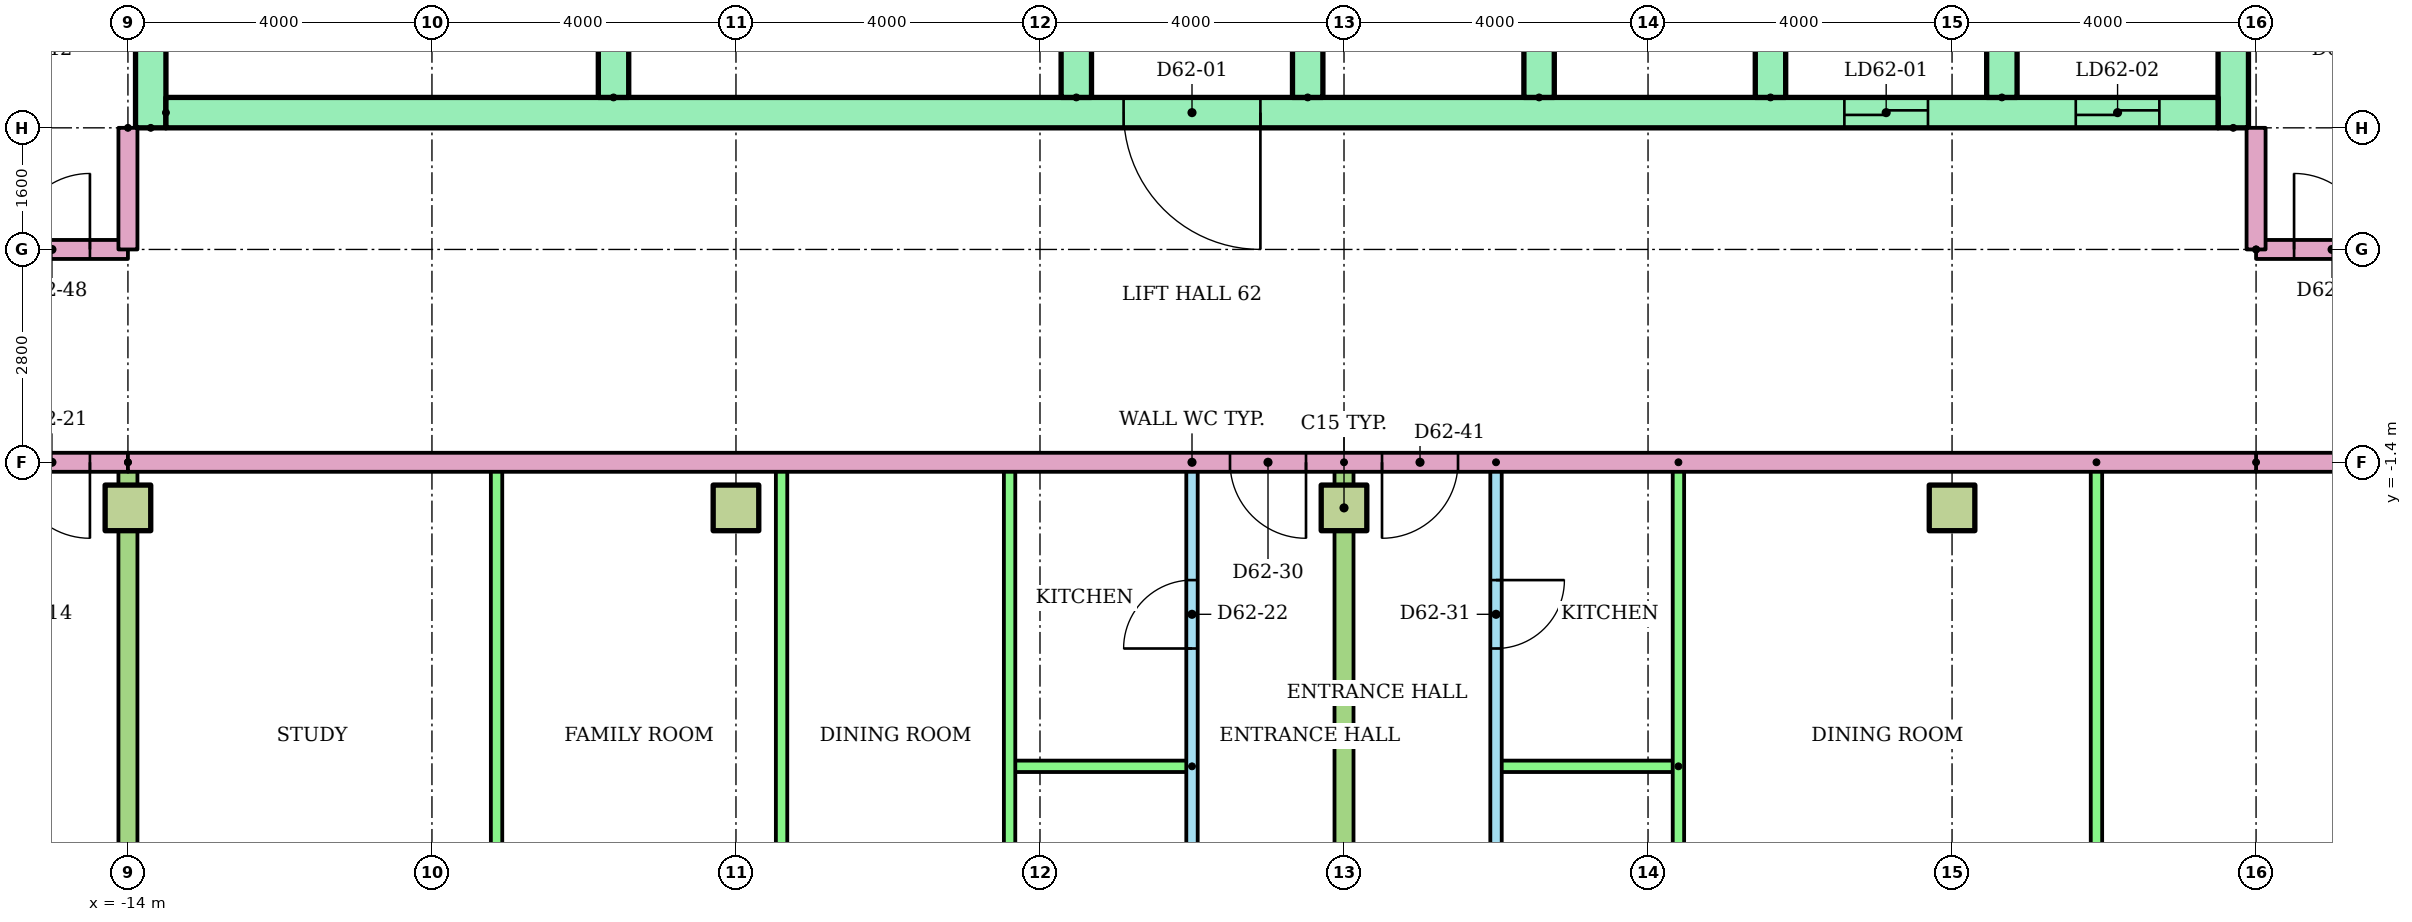
"""IFC4 building model, lengths in metres.
Left out: names, types, materials, properties, quantities, classifications, styles, units other than length and angle.
Written with IfcOpenShell. Run it as: python <this file> out.ifc"""

import sys

from ifc_helpers import new_model, si_unit, direction, frame, frame_2d, origin, origin_2d, place, context, subcontext, project, spatial, rectangle, extrude, element, fill, save


model = new_model("IFC4")
c1 = context("Model", 3, precision=1e-05, world=origin(), true_north=direction((0.0, 1.0)))
c2 = subcontext(c1, "Body", "Model", "MODEL_VIEW")
j1 = project(units=[si_unit("LENGTHUNIT", "METRE"), si_unit("PLANEANGLEUNIT", "RADIAN")], contexts=[c1])
p1 = place(None, origin())
s1 = spatial("IfcSite", under=j1, at=p1, CompositionType="ELEMENT")
p2 = place(p1, origin())
s2 = spatial("IfcBuilding", under=s1, at=p2, CompositionType="ELEMENT")
p3 = place(p2, frame((0.0, 0.0, 236.4)))
s3 = spatial("IfcBuildingStorey", under=s2, at=p3, CompositionType="ELEMENT", Elevation=236.4)
for number, where in (
    (1, (-14.0, -2.0, 0.0)),
    (2, (-6.0, -2.0, 0.0)),
    (3, (2.0, -2.0, 0.0)),
    (4, (10.0, -2.0, 0.0)),
):
    element("IfcColumn", number, at=place(p3, frame(where)), inside=s3, PredefinedType="COLUMN", context=c2, shape_type="SweptSolid", body=[
        extrude(rectangle(XDim=0.6, YDim=0.6, at=origin_2d()), origin(), (0.0, 0.0, 1.0), 3.2),
    ])
for number, where, z_axis, x_axis in (
    (5, (-13.7, 3.0, 0.0), (0.0, 0.0, 1.0), (0.0, 1.0, 0.0)),
    (6, (13.7, 3.0, 0.0), (0.0, 0.0, 1.0), (0.0, 1.0, 0.0)),
):
    element("IfcWall", number, at=place(p3, frame(where, z_axis=z_axis, x_axis=x_axis)), inside=s3, PredefinedType="SHEAR", context=c2, shape_type="SweptSolid", body=[
        extrude(rectangle(XDim=17.0, YDim=0.4, at=frame_2d((8.5, 0.0))), origin(), (0.0, 0.0, 1.0), 2.8),
    ])
p4 = place(p3, frame((-13.5, 3.2, 0.0)))
e7 = element("IfcWall", 7, at=p4, inside=s3, PredefinedType="SHEAR", context=c2, shape_type="SweptSolid", body=[
    extrude(rectangle(XDim=27.0, YDim=0.4, at=frame_2d((13.5, 0.0))), origin(), (0.0, 0.0, 1.0), 2.8),
])
p5 = place(p4, frame((22.083, 0.0, 0.0)))
e8 = element("IfcOpeningElement", 8, at=p5, cuts=e7, PredefinedType="OPENING", context=c2, shape_type="SweptSolid", body=[
    extrude(rectangle(XDim=1.1, YDim=2.1, at=frame_2d((0.55, 1.05))), frame((0.0, 0.21, 0.0), z_axis=(0.0, -1.0, 0.0), x_axis=(1.0, 0.0, 0.0)), (0.0, 0.0, 1.0), 0.42),
])
p6 = place(p4, frame((25.128, 0.0, 0.0)))
e9 = element("IfcOpeningElement", 9, at=p6, cuts=e7, PredefinedType="OPENING", context=c2, shape_type="SweptSolid", body=[
    extrude(rectangle(XDim=1.1, YDim=2.1, at=frame_2d((0.55, 1.05))), frame((0.0, 0.21, 0.0), z_axis=(0.0, -1.0, 0.0), x_axis=(1.0, 0.0, 0.0)), (0.0, 0.0, 1.0), 0.42),
])
p7 = place(p4, frame((12.6, 0.0, 0.0)))
e10 = element("IfcOpeningElement", 10, at=p7, cuts=e7, PredefinedType="OPENING", context=c2, shape_type="SweptSolid", body=[
    extrude(rectangle(XDim=1.8, YDim=2.1, at=frame_2d((0.9, 1.05))), frame((0.0, 0.21, 0.0), z_axis=(0.0, -1.0, 0.0), x_axis=(1.0, 0.0, 0.0)), (0.0, 0.0, 1.0), 0.42),
])
for number, where, z_axis, x_axis in (
    (11, (-7.611, 3.4, 0.0), (0.0, 0.0, 1.0), (0.0, 1.0, 0.0)),
    (12, (-1.522, 3.4, 0.0), (0.0, 0.0, 1.0), (0.0, 1.0, 0.0)),
    (13, (1.522, 3.4, 0.0), (0.0, 0.0, 1.0), (0.0, 1.0, 0.0)),
    (14, (4.567, 3.4, 0.0), (0.0, 0.0, 1.0), (0.0, 1.0, 0.0)),
    (15, (7.611, 3.4, 0.0), (0.0, 0.0, 1.0), (0.0, 1.0, 0.0)),
    (16, (10.656, 3.4, 0.0), (0.0, 0.0, 1.0), (0.0, 1.0, 0.0)),
):
    element("IfcWall", number, at=place(p3, frame(where, z_axis=z_axis, x_axis=x_axis)), inside=s3, PredefinedType="SHEAR", context=c2, shape_type="SweptSolid", body=[
        extrude(rectangle(XDim=3.0, YDim=0.4, at=frame_2d((1.5, 0.0))), origin(), (0.0, 0.0, 1.0), 2.8),
    ])
p8 = place(p3, frame((0.0, -8.6, 0.0), z_axis=(0.0, 0.0, 1.0), x_axis=(0.0, 1.0, 0.0)))
e17 = element("IfcWall", 17, at=p8, inside=s3, PredefinedType="PARTITIONING", context=c2, shape_type="SweptSolid", body=[
    extrude(rectangle(XDim=7.2, YDim=0.15, at=frame_2d((3.6, 0.0))), origin(), (0.0, 0.0, 1.0), 2.4),
])
p9 = place(p8, frame((4.75, 0.0, 0.0)))
e18 = element("IfcOpeningElement", 18, at=p9, cuts=e17, PredefinedType="OPENING", context=c2, shape_type="SweptSolid", body=[
    extrude(rectangle(XDim=0.9, YDim=2.1, at=frame_2d((0.45, 1.05))), frame((0.0, 0.085, 0.0), z_axis=(0.0, -1.0, 0.0), x_axis=(1.0, 0.0, 0.0)), (0.0, 0.0, 1.0), 0.17),
])
p10 = place(p8, frame((1.2, 0.0, 0.0)))
e19 = element("IfcOpeningElement", 19, at=p10, cuts=e17, PredefinedType="OPENING", context=c2, shape_type="SweptSolid", body=[
    extrude(rectangle(XDim=0.8, YDim=2.1, at=frame_2d((0.4, 1.05))), frame((0.0, 0.085, 0.0), z_axis=(0.0, -1.0, 0.0), x_axis=(1.0, 0.0, 0.0)), (0.0, 0.0, 1.0), 0.17),
])
p11 = place(p3, frame((0.0, -5.4, 0.0), z_axis=(0.0, 0.0, 1.0), x_axis=(-1.0, 0.0, 0.0)))
e20 = element("IfcWall", 20, at=p11, inside=s3, PredefinedType="PARTITIONING", context=c2, shape_type="SweptSolid", body=[
    extrude(rectangle(XDim=2.4, YDim=0.15, at=frame_2d((1.2, 0.0))), origin(), (0.0, 0.0, 1.0), 2.4),
])
for number, where, z_axis, x_axis in (
    (21, (-2.4, -8.6, 0.0), (0.0, 0.0, 1.0), (0.0, 1.0, 0.0)),
    (22, (-5.4, -8.6, 0.0), (0.0, 0.0, 1.0), (0.0, 1.0, 0.0)),
    (23, (-9.15, -8.6, 0.0), (0.0, 0.0, 1.0), (0.0, 1.0, 0.0)),
):
    element("IfcWall", number, at=place(p3, frame(where, z_axis=z_axis, x_axis=x_axis)), inside=s3, PredefinedType="PARTITIONING", context=c2, shape_type="SweptSolid", body=[
        extrude(rectangle(XDim=7.2, YDim=0.15, at=frame_2d((3.6, 0.0))), origin(), (0.0, 0.0, 1.0), 2.4),
    ])
p12 = place(p3, frame((-14.0, -1.4, 0.0), z_axis=(0.0, 0.0, 1.0), x_axis=(0.0, -1.0, 0.0)))
e24 = element("IfcWall", 24, at=p12, inside=s3, PredefinedType="PARTITIONING", context=c2, shape_type="SweptSolid", body=[
    extrude(rectangle(XDim=15.11, YDim=0.25, at=frame_2d((7.555, 0.0))), origin(), (0.0, 0.0, 1.0), 2.4),
])
p13 = place(p3, frame((4.0, -1.4, 0.0), z_axis=(0.0, 0.0, 1.0), x_axis=(0.0, -1.0, 0.0)))
e25 = element("IfcWall", 25, at=p13, inside=s3, PredefinedType="PARTITIONING", context=c2, shape_type="SweptSolid", body=[
    extrude(rectangle(XDim=7.2, YDim=0.15, at=frame_2d((3.6, 0.0))), origin(), (0.0, 0.0, 1.0), 2.4),
])
p14 = place(p13, frame((1.55, 0.0, 0.0)))
e26 = element("IfcOpeningElement", 26, at=p14, cuts=e25, PredefinedType="OPENING", context=c2, shape_type="SweptSolid", body=[
    extrude(rectangle(XDim=0.9, YDim=2.1, at=frame_2d((0.45, 1.05))), frame((0.0, 0.085, 0.0), z_axis=(0.0, -1.0, 0.0), x_axis=(1.0, 0.0, 0.0)), (0.0, 0.0, 1.0), 0.17),
])
p15 = place(p13, frame((5.2, 0.0, 0.0)))
e27 = element("IfcOpeningElement", 27, at=p15, cuts=e25, PredefinedType="OPENING", context=c2, shape_type="SweptSolid", body=[
    extrude(rectangle(XDim=0.8, YDim=2.1, at=frame_2d((0.4, 1.05))), frame((0.0, 0.085, 0.0), z_axis=(0.0, -1.0, 0.0), x_axis=(1.0, 0.0, 0.0)), (0.0, 0.0, 1.0), 0.17),
])
p16 = place(p3, frame((6.4, -5.4, 0.0), z_axis=(0.0, 0.0, 1.0), x_axis=(-1.0, 0.0, 0.0)))
e28 = element("IfcWall", 28, at=p16, inside=s3, PredefinedType="PARTITIONING", context=c2, shape_type="SweptSolid", body=[
    extrude(rectangle(XDim=2.4, YDim=0.15, at=frame_2d((1.2, 0.0))), origin(), (0.0, 0.0, 1.0), 2.4),
])
for number, where, z_axis, x_axis in (
    (29, (6.4, -1.4, 0.0), (0.0, 0.0, 1.0), (0.0, -1.0, 0.0)),
    (30, (11.9, -1.4, 0.0), (0.0, 0.0, 1.0), (0.0, -1.0, 0.0)),
):
    element("IfcWall", number, at=place(p3, frame(where, z_axis=z_axis, x_axis=x_axis)), inside=s3, PredefinedType="PARTITIONING", context=c2, shape_type="SweptSolid", body=[
        extrude(rectangle(XDim=7.2, YDim=0.15, at=frame_2d((3.6, 0.0))), origin(), (0.0, 0.0, 1.0), 2.4),
    ])
p17 = place(p3, frame((2.0, -1.4, 0.0), z_axis=(0.0, 0.0, 1.0), x_axis=(0.0, -1.0, 0.0)))
e31 = element("IfcWall", 31, at=p17, inside=s3, PredefinedType="PARTITIONING", context=c2, shape_type="SweptSolid", body=[
    extrude(rectangle(XDim=15.11, YDim=0.25, at=frame_2d((7.555, 0.0))), origin(), (0.0, 0.0, 1.0), 2.4),
])
p18 = place(p3, frame((-14.0, -1.4, 0.0), z_axis=(0.0, 0.0, 1.0), x_axis=(-1.0, 0.0, 0.0)))
e32 = element("IfcWall", 32, at=p18, inside=s3, PredefinedType="PARTITIONING", context=c2, shape_type="SweptSolid", body=[
    extrude(rectangle(XDim=14.92, YDim=0.25, at=frame_2d((7.46, 0.0))), origin(), (0.0, 0.0, 1.0), 2.4),
])
p19 = place(p18, frame((0.5, 0.0, 0.0)))
e33 = element("IfcOpeningElement", 33, at=p19, cuts=e32, PredefinedType="OPENING", context=c2, shape_type="SweptSolid", body=[
    extrude(rectangle(XDim=1.0, YDim=2.1, at=frame_2d((0.5, 1.05))), frame((0.0, 0.135, 0.0), z_axis=(0.0, -1.0, 0.0), x_axis=(1.0, 0.0, 0.0)), (0.0, 0.0, 1.0), 0.27),
])
p20 = place(p3, frame((28.92, -1.4, 0.0), z_axis=(0.0, 0.0, 1.0), x_axis=(-1.0, 0.0, 0.0)))
e34 = element("IfcWall", 34, at=p20, inside=s3, PredefinedType="PARTITIONING", context=c2, shape_type="SweptSolid", body=[
    extrude(rectangle(XDim=14.92, YDim=0.25, at=frame_2d((7.46, 0.0))), origin(), (0.0, 0.0, 1.0), 2.4),
])
p21 = place(p3, frame((-28.92, 1.4, 0.0)))
e35 = element("IfcWall", 35, at=p21, inside=s3, PredefinedType="PARTITIONING", context=c2, shape_type="SweptSolid", body=[
    extrude(rectangle(XDim=14.92, YDim=0.25, at=frame_2d((7.46, 0.0))), origin(), (0.0, 0.0, 1.0), 2.4),
])
p22 = place(p21, frame((13.42, 0.0, 0.0)))
e36 = element("IfcOpeningElement", 36, at=p22, cuts=e35, PredefinedType="OPENING", context=c2, shape_type="SweptSolid", body=[
    extrude(rectangle(XDim=1.0, YDim=2.1, at=frame_2d((0.5, 1.05))), frame((0.0, 0.135, 0.0), z_axis=(0.0, -1.0, 0.0), x_axis=(1.0, 0.0, 0.0)), (0.0, 0.0, 1.0), 0.27),
])
p23 = place(p3, frame((14.0, 1.4, 0.0)))
e37 = element("IfcWall", 37, at=p23, inside=s3, PredefinedType="PARTITIONING", context=c2, shape_type="SweptSolid", body=[
    extrude(rectangle(XDim=14.92, YDim=0.25, at=frame_2d((7.46, 0.0))), origin(), (0.0, 0.0, 1.0), 2.4),
])
p24 = place(p23, frame((0.5, 0.0, 0.0)))
e38 = element("IfcOpeningElement", 38, at=p24, cuts=e37, PredefinedType="OPENING", context=c2, shape_type="SweptSolid", body=[
    extrude(rectangle(XDim=1.0, YDim=2.1, at=frame_2d((0.5, 1.05))), frame((0.0, 0.135, 0.0), z_axis=(0.0, -1.0, 0.0), x_axis=(1.0, 0.0, 0.0)), (0.0, 0.0, 1.0), 0.27),
])
p25 = place(p3, frame((14.0, -1.4, 0.0), z_axis=(0.0, 0.0, 1.0), x_axis=(-1.0, 0.0, 0.0)))
e39 = element("IfcWall", 39, at=p25, inside=s3, PredefinedType="PARTITIONING", context=c2, shape_type="SweptSolid", body=[
    extrude(rectangle(XDim=28.0, YDim=0.25, at=frame_2d((14.0, 0.0))), origin(), (0.0, 0.0, 1.0), 2.4),
])
p26 = place(p25, frame((12.5, 0.0, 0.0)))
e40 = element("IfcOpeningElement", 40, at=p26, cuts=e39, PredefinedType="OPENING", context=c2, shape_type="SweptSolid", body=[
    extrude(rectangle(XDim=1.0, YDim=2.1, at=frame_2d((0.5, 1.05))), frame((0.0, 0.135, 0.0), z_axis=(0.0, -1.0, 0.0), x_axis=(1.0, 0.0, 0.0)), (0.0, 0.0, 1.0), 0.27),
])
p27 = place(p25, frame((10.5, 0.0, 0.0)))
e41 = element("IfcOpeningElement", 41, at=p27, cuts=e39, PredefinedType="OPENING", context=c2, shape_type="SweptSolid", body=[
    extrude(rectangle(XDim=1.0, YDim=2.1, at=frame_2d((0.5, 1.05))), frame((0.0, 0.135, 0.0), z_axis=(0.0, -1.0, 0.0), x_axis=(1.0, 0.0, 0.0)), (0.0, 0.0, 1.0), 0.27),
])
for number, where, z_axis, x_axis in (
    (42, (-14.0, 3.0, 0.0), (0.0, 0.0, 1.0), (0.0, -1.0, 0.0)),
    (43, (14.0, 1.4, 0.0), (0.0, 0.0, 1.0), (0.0, 1.0, 0.0)),
):
    element("IfcWall", number, at=place(p3, frame(where, z_axis=z_axis, x_axis=x_axis)), inside=s3, PredefinedType="PARTITIONING", context=c2, shape_type="SweptSolid", body=[
        extrude(rectangle(XDim=1.6, YDim=0.25, at=frame_2d((0.8, 0.0))), origin(), (0.0, 0.0, 1.0), 2.4),
    ])
p28 = place(p5, origin())
e44 = element("IfcDoor", 44, at=p28, inside=s3, OperationType="SLIDING_TO_LEFT", PredefinedType="DOOR", context=c2, shape_type="SweptSolid", body=[
    extrude(rectangle(XDim=1.1, YDim=2.1, at=frame_2d((0.55, 1.05))), frame((0.0, 0.025, 0.0), z_axis=(0.0, -1.0, 0.0), x_axis=(1.0, 0.0, 0.0)), (0.0, 0.0, 1.0), 0.05),
])
fill(e8, e44)
p29 = place(p6, origin())
e45 = element("IfcDoor", 45, at=p29, inside=s3, OperationType="SLIDING_TO_LEFT", PredefinedType="DOOR", context=c2, shape_type="SweptSolid", body=[
    extrude(rectangle(XDim=1.1, YDim=2.1, at=frame_2d((0.55, 1.05))), frame((0.0, 0.025, 0.0), z_axis=(0.0, -1.0, 0.0), x_axis=(1.0, 0.0, 0.0)), (0.0, 0.0, 1.0), 0.05),
])
fill(e9, e45)
p30 = place(p7, frame((1.8, 0.0, 0.0), z_axis=(0.0, 0.0, 1.0), x_axis=(-1.0, 0.0, 0.0)))
e46 = element("IfcDoor", 46, at=p30, inside=s3, OperationType="DOUBLE_DOOR_SINGLE_SWING", PredefinedType="DOOR", context=c2, shape_type="SweptSolid", body=[
    extrude(rectangle(XDim=1.8, YDim=2.1, at=frame_2d((0.9, 1.05))), frame((0.0, 0.025, 0.0), z_axis=(0.0, -1.0, 0.0), x_axis=(1.0, 0.0, 0.0)), (0.0, 0.0, 1.0), 0.05),
])
fill(e10, e46)
p31 = place(p19, origin())
e47 = element("IfcDoor", 47, at=p31, inside=s3, OperationType="SINGLE_SWING_LEFT", PredefinedType="DOOR", context=c2, shape_type="SweptSolid", body=[
    extrude(rectangle(XDim=1.0, YDim=2.1, at=frame_2d((0.5, 1.05))), frame((0.0, 0.025, 0.0), z_axis=(0.0, -1.0, 0.0), x_axis=(1.0, 0.0, 0.0)), (0.0, 0.0, 1.0), 0.05),
])
fill(e33, e47)
p32 = place(p9, origin())
e48 = element("IfcDoor", 48, at=p32, inside=s3, OperationType="SINGLE_SWING_LEFT", PredefinedType="DOOR", context=c2, shape_type="SweptSolid", body=[
    extrude(rectangle(XDim=0.9, YDim=2.1, at=frame_2d((0.45, 1.05))), frame((0.0, 0.025, 0.0), z_axis=(0.0, -1.0, 0.0), x_axis=(1.0, 0.0, 0.0)), (0.0, 0.0, 1.0), 0.05),
])
fill(e18, e48)
p33 = place(p26, origin())
e49 = element("IfcDoor", 49, at=p33, inside=s3, OperationType="SINGLE_SWING_LEFT", PredefinedType="DOOR", context=c2, shape_type="SweptSolid", body=[
    extrude(rectangle(XDim=1.0, YDim=2.1, at=frame_2d((0.5, 1.05))), frame((0.0, 0.025, 0.0), z_axis=(0.0, -1.0, 0.0), x_axis=(1.0, 0.0, 0.0)), (0.0, 0.0, 1.0), 0.05),
])
fill(e40, e49)
p34 = place(p14, origin())
e50 = element("IfcDoor", 50, at=p34, inside=s3, OperationType="SINGLE_SWING_LEFT", PredefinedType="DOOR", context=c2, shape_type="SweptSolid", body=[
    extrude(rectangle(XDim=0.9, YDim=2.1, at=frame_2d((0.45, 1.05))), frame((0.0, 0.025, 0.0), z_axis=(0.0, -1.0, 0.0), x_axis=(1.0, 0.0, 0.0)), (0.0, 0.0, 1.0), 0.05),
])
fill(e26, e50)
p35 = place(p27, origin())
e51 = element("IfcDoor", 51, at=p35, inside=s3, OperationType="SINGLE_SWING_RIGHT", PredefinedType="DOOR", context=c2, shape_type="SweptSolid", body=[
    extrude(rectangle(XDim=1.0, YDim=2.1, at=frame_2d((0.5, 1.05))), frame((0.0, 0.025, 0.0), z_axis=(0.0, -1.0, 0.0), x_axis=(1.0, 0.0, 0.0)), (0.0, 0.0, 1.0), 0.05),
])
fill(e41, e51)
p36 = place(p22, origin())
e52 = element("IfcDoor", 52, at=p36, inside=s3, OperationType="SINGLE_SWING_RIGHT", PredefinedType="DOOR", context=c2, shape_type="SweptSolid", body=[
    extrude(rectangle(XDim=1.0, YDim=2.1, at=frame_2d((0.5, 1.05))), frame((0.0, 0.025, 0.0), z_axis=(0.0, -1.0, 0.0), x_axis=(1.0, 0.0, 0.0)), (0.0, 0.0, 1.0), 0.05),
])
fill(e36, e52)
p37 = place(p24, origin())
e53 = element("IfcDoor", 53, at=p37, inside=s3, OperationType="SINGLE_SWING_LEFT", PredefinedType="DOOR", context=c2, shape_type="SweptSolid", body=[
    extrude(rectangle(XDim=1.0, YDim=2.1, at=frame_2d((0.5, 1.05))), frame((0.0, 0.025, 0.0), z_axis=(0.0, -1.0, 0.0), x_axis=(1.0, 0.0, 0.0)), (0.0, 0.0, 1.0), 0.05),
])
fill(e38, e53)
save(model, sys.argv[1])
